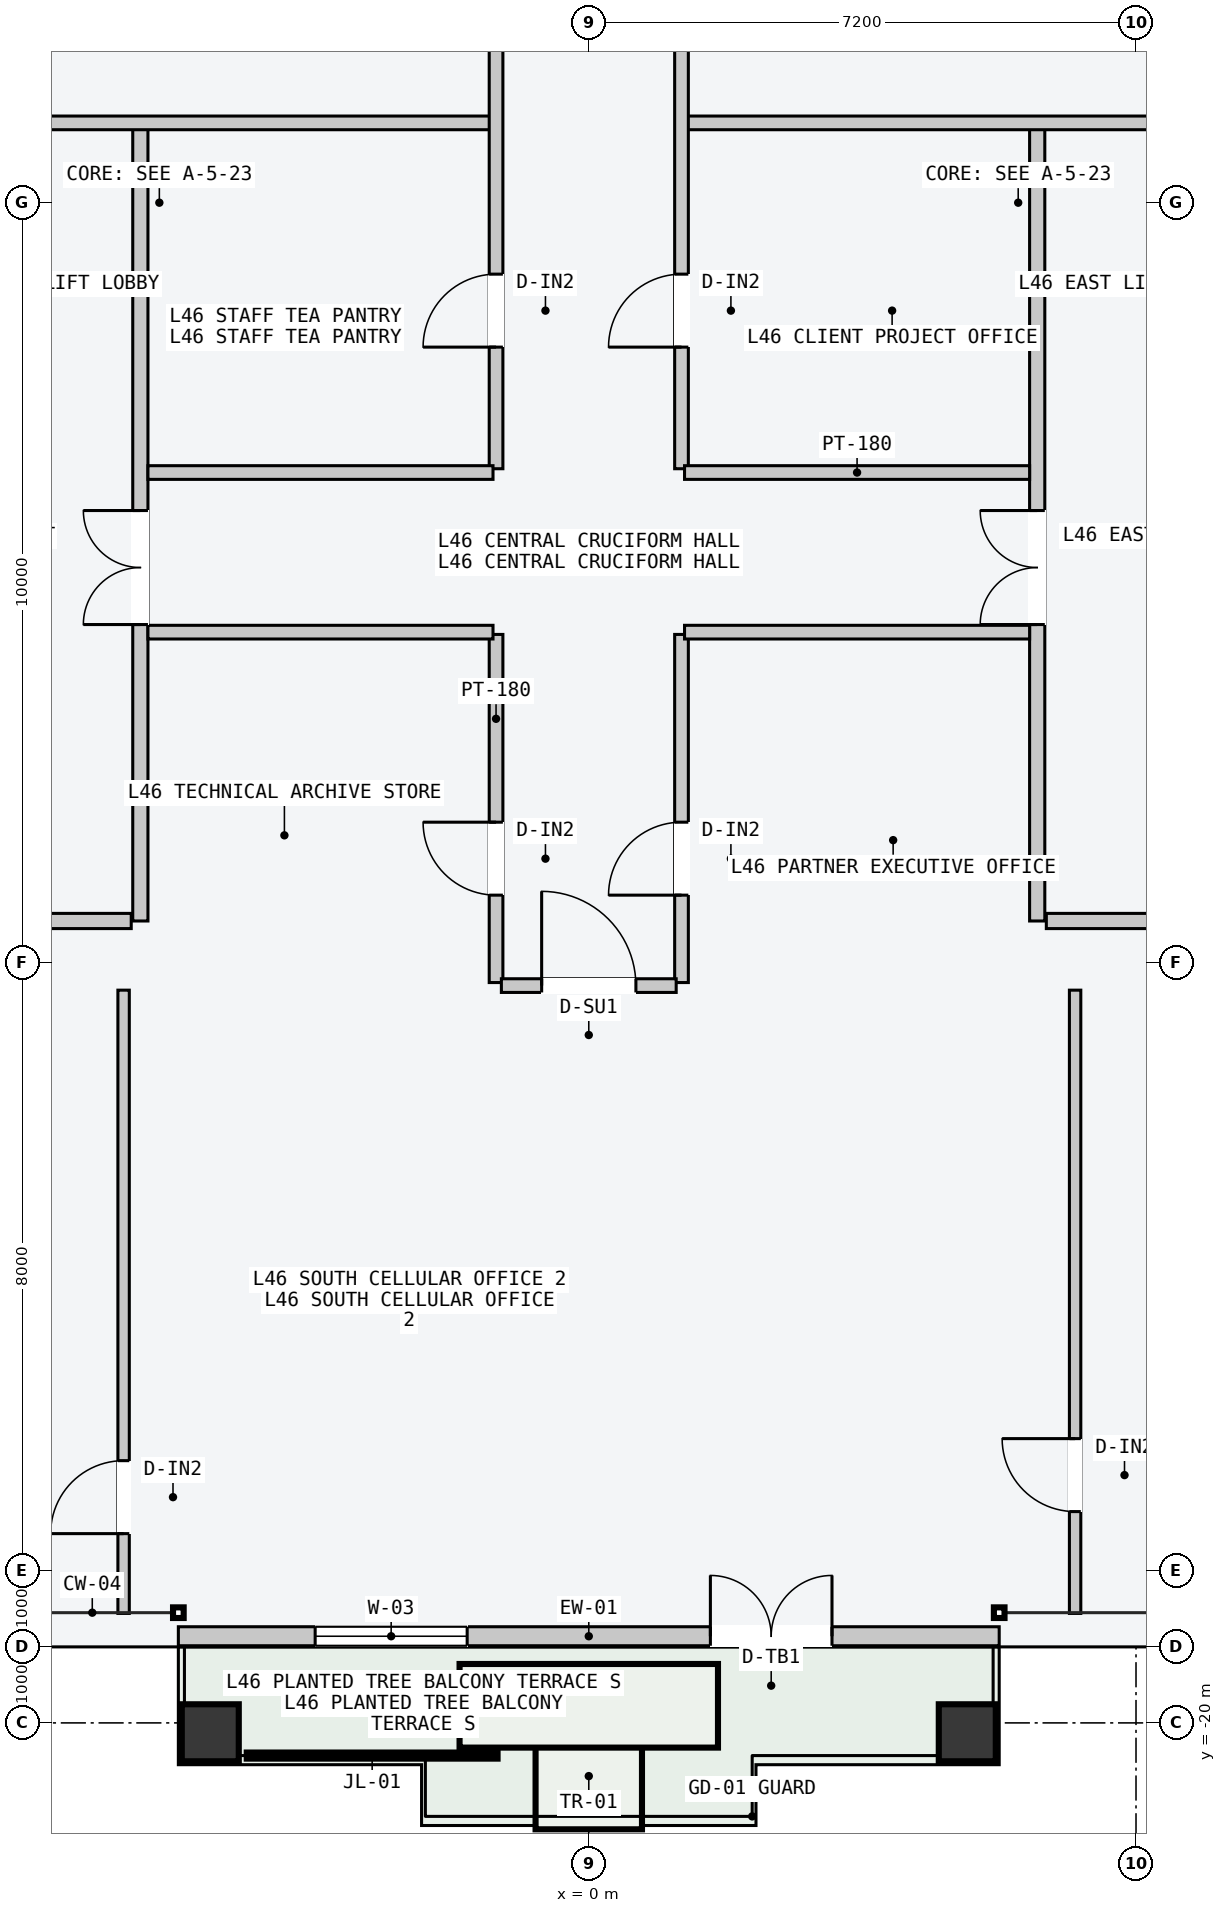
"""IFC4 building model, lengths in metres.
Left out: names, types, materials, properties, quantities, classifications, styles, units other than length and angle.
Written with IfcOpenShell. Run it as: python <this file> out.ifc"""

import sys

from ifc_helpers import new_model, si_unit, direction, frame, frame_2d, origin, origin_2d, place, context, subcontext, project, spatial, rectangle, hollow_rectangle, extrude, element, fill, save


model = new_model("IFC4")
c1 = context("Model", 3, precision=1e-05, world=origin(), true_north=direction((0.0, 1.0)))
c2 = subcontext(c1, "Body", "Model", "MODEL_VIEW")
j1 = project(units=[si_unit("LENGTHUNIT", "METRE"), si_unit("PLANEANGLEUNIT", "RADIAN")], contexts=[c1])
p1 = place(None, origin())
s1 = spatial("IfcSite", under=j1, at=p1, CompositionType="ELEMENT")
p2 = place(p1, origin())
s2 = spatial("IfcBuilding", under=s1, at=p2, CompositionType="ELEMENT")
p3 = place(p2, frame((0.0, 0.0, 176.7)))
s3 = spatial("IfcBuildingStorey", under=s2, at=p3, CompositionType="ELEMENT", Elevation=176.7)
for number, where, z_axis, x_axis in (
    (1, (-4.98, -20.13, 0.0), (0.0, 0.0, 1.0), (1.0, 0.0, 0.0)),
    (2, (4.98, -20.13, 0.0), (0.0, 0.0, 1.0), (1.0, 0.0, 0.0)),
):
    element("IfcColumn", number, at=place(p3, frame(where, z_axis=z_axis, x_axis=x_axis)), inside=s3, PredefinedType="COLUMN", context=c2, shape_type="SweptSolid", body=[
        extrude(hollow_rectangle(XDim=0.75, YDim=0.75, WallThickness=0.032, at=origin_2d()), origin(), (0.0, 0.0, 1.0), 3.6),
    ])
p4 = place(p3, frame((-5.4, -18.86, 0.0), z_axis=(0.0, 0.0, 1.0), x_axis=(1.0, 0.0, 0.0)))
e3 = element("IfcWall", 3, at=p4, inside=s3, PredefinedType="STANDARD", context=c2, shape_type="SweptSolid", body=[
    extrude(rectangle(XDim=10.8, YDim=0.25, at=frame_2d((5.4, 0.0))), origin(), (0.0, 0.0, 1.0), 3.4),
])
p5 = place(p4, frame((7.0, 0.0, 0.0)))
e4 = element("IfcOpeningElement", 4, at=p5, cuts=e3, PredefinedType="OPENING", context=c2, shape_type="SweptSolid", body=[
    extrude(rectangle(XDim=1.6, YDim=2.2, at=frame_2d((0.8, 1.1))), frame((0.0, 0.135, 0.0), z_axis=(0.0, -1.0, 0.0), x_axis=(1.0, 0.0, 0.0)), (0.0, 0.0, 1.0), 0.27),
])
p6 = place(p4, frame((1.8, 0.0, 0.85)))
e5 = element("IfcOpeningElement", 5, at=p6, cuts=e3, PredefinedType="OPENING", context=c2, shape_type="SweptSolid", body=[
    extrude(rectangle(XDim=2.0, YDim=2.1, at=frame_2d((1.0, 1.05))), frame((0.0, 0.135, 0.0), z_axis=(0.0, -1.0, 0.0), x_axis=(1.0, 0.0, 0.0)), (0.0, 0.0, 1.0), 0.27),
])
p7 = place(p3, frame((-5.9, -9.45, 0.0), z_axis=(0.0, 0.0, 1.0), x_axis=(0.0, 1.0, 0.0)))
e6 = element("IfcWall", 6, at=p7, inside=s3, PredefinedType="PARTITIONING", context=c2, shape_type="SweptSolid", body=[
    extrude(rectangle(XDim=10.5, YDim=0.2, at=frame_2d((5.25, 0.0))), origin(), (0.0, 0.0, 1.0), 3.4),
])
p8 = place(p7, frame((3.9, 0.0, 0.0)))
e7 = element("IfcOpeningElement", 7, at=p8, cuts=e6, PredefinedType="OPENING", context=c2, shape_type="SweptSolid", body=[
    extrude(rectangle(XDim=1.5, YDim=2.2, at=frame_2d((0.75, 1.1))), frame((0.0, 0.11, 0.0), z_axis=(0.0, -1.0, 0.0), x_axis=(1.0, 0.0, 0.0)), (0.0, 0.0, 1.0), 0.22),
])
p9 = place(p3, frame((-6.02, -9.45, 0.0), z_axis=(0.0, 0.0, 1.0), x_axis=(-1.0, 0.0, 0.0)))
e8 = element("IfcWall", 8, at=p9, inside=s3, PredefinedType="PARTITIONING", context=c2, shape_type="SweptSolid", body=[
    extrude(rectangle(XDim=1.8, YDim=0.2, at=frame_2d((0.9, 0.0))), origin(), (0.0, 0.0, 1.0), 3.4),
])
p10 = place(p3, frame((5.9, -9.45, 0.0), z_axis=(0.0, 0.0, 1.0), x_axis=(0.0, 1.0, 0.0)))
e9 = element("IfcWall", 9, at=p10, inside=s3, PredefinedType="PARTITIONING", context=c2, shape_type="SweptSolid", body=[
    extrude(rectangle(XDim=10.5, YDim=0.2, at=frame_2d((5.25, 0.0))), origin(), (0.0, 0.0, 1.0), 3.4),
])
p11 = place(p10, frame((3.9, 0.0, 0.0)))
e10 = element("IfcOpeningElement", 10, at=p11, cuts=e9, PredefinedType="OPENING", context=c2, shape_type="SweptSolid", body=[
    extrude(rectangle(XDim=1.5, YDim=2.2, at=frame_2d((0.75, 1.1))), frame((0.0, 0.11, 0.0), z_axis=(0.0, -1.0, 0.0), x_axis=(1.0, 0.0, 0.0)), (0.0, 0.0, 1.0), 0.22),
])
p12 = place(p3, frame((6.02, -9.45, 0.0), z_axis=(0.0, 0.0, 1.0), x_axis=(1.0, 0.0, 0.0)))
e11 = element("IfcWall", 11, at=p12, inside=s3, PredefinedType="PARTITIONING", context=c2, shape_type="SweptSolid", body=[
    extrude(rectangle(XDim=1.8, YDim=0.2, at=frame_2d((0.9, 0.0))), origin(), (0.0, 0.0, 1.0), 3.4),
])
p13 = place(p3, frame((-10.05, 1.05, 0.0), z_axis=(0.0, 0.0, 1.0), x_axis=(1.0, 0.0, 0.0)))
e12 = element("IfcWall", 12, at=p13, inside=s3, PredefinedType="PARTITIONING", context=c2, shape_type="SweptSolid", body=[
    extrude(rectangle(XDim=8.79, YDim=0.18, at=frame_2d((4.395, 0.0))), origin(), (0.0, 0.0, 1.0), 3.4),
])
p14 = place(p3, frame((-1.22, -3.5, 0.0), z_axis=(0.0, 0.0, 1.0), x_axis=(0.0, 1.0, 0.0)))
e13 = element("IfcWall", 13, at=p14, inside=s3, PredefinedType="PARTITIONING", context=c2, shape_type="SweptSolid", body=[
    extrude(rectangle(XDim=15.17, YDim=0.18, at=frame_2d((7.585, 0.0))), origin(), (0.0, 0.0, 1.0), 3.4),
])
p15 = place(p14, frame((6.1, 0.0, 0.0)))
e14 = element("IfcOpeningElement", 14, at=p15, cuts=e13, PredefinedType="OPENING", context=c2, shape_type="SweptSolid", body=[
    extrude(rectangle(XDim=1.24, YDim=2.24, at=frame_2d((0.62, 1.12))), frame((0.0, 0.1, 0.0), z_axis=(0.0, -1.0, 0.0), x_axis=(1.0, 0.0, 0.0)), (0.0, 0.0, 1.0), 0.2),
])
p16 = place(p14, frame((1.6, 0.0, 0.0)))
e15 = element("IfcOpeningElement", 15, at=p16, cuts=e13, PredefinedType="OPENING", context=c2, shape_type="SweptSolid", body=[
    extrude(rectangle(XDim=0.96, YDim=2.18, at=frame_2d((0.48, 1.09))), frame((0.0, 0.1, 0.0), z_axis=(0.0, -1.0, 0.0), x_axis=(1.0, 0.0, 0.0)), (0.0, 0.0, 1.0), 0.2),
])
p17 = place(p3, frame((-5.8, -3.55, 0.0), z_axis=(0.0, 0.0, 1.0), x_axis=(1.0, 0.0, 0.0)))
e16 = element("IfcWall", 16, at=p17, inside=s3, PredefinedType="PARTITIONING", context=c2, shape_type="SweptSolid", body=[
    extrude(rectangle(XDim=4.54, YDim=0.18, at=frame_2d((2.27, 0.0))), origin(), (0.0, 0.0, 1.0), 3.4),
])
p18 = place(p3, frame((1.26, 1.05, 0.0), z_axis=(0.0, 0.0, 1.0), x_axis=(1.0, 0.0, 0.0)))
e17 = element("IfcWall", 17, at=p18, inside=s3, PredefinedType="PARTITIONING", context=c2, shape_type="SweptSolid", body=[
    extrude(rectangle(XDim=8.8, YDim=0.18, at=frame_2d((4.4, 0.0))), origin(), (0.0, 0.0, 1.0), 3.4),
])
p19 = place(p3, frame((1.22, -3.5, 0.0), z_axis=(0.0, 0.0, 1.0), x_axis=(0.0, 1.0, 0.0)))
e18 = element("IfcWall", 18, at=p19, inside=s3, PredefinedType="PARTITIONING", context=c2, shape_type="SweptSolid", body=[
    extrude(rectangle(XDim=15.17, YDim=0.18, at=frame_2d((7.585, 0.0))), origin(), (0.0, 0.0, 1.0), 3.4),
])
p20 = place(p19, frame((6.1, 0.0, 0.0)))
e19 = element("IfcOpeningElement", 19, at=p20, cuts=e18, PredefinedType="OPENING", context=c2, shape_type="SweptSolid", body=[
    extrude(rectangle(XDim=1.24, YDim=2.24, at=frame_2d((0.62, 1.12))), frame((0.0, 0.1, 0.0), z_axis=(0.0, -1.0, 0.0), x_axis=(1.0, 0.0, 0.0)), (0.0, 0.0, 1.0), 0.2),
])
p21 = place(p19, frame((1.6, 0.0, 0.0)))
e20 = element("IfcOpeningElement", 20, at=p21, cuts=e18, PredefinedType="OPENING", context=c2, shape_type="SweptSolid", body=[
    extrude(rectangle(XDim=0.96, YDim=2.18, at=frame_2d((0.48, 1.09))), frame((0.0, 0.1, 0.0), z_axis=(0.0, -1.0, 0.0), x_axis=(1.0, 0.0, 0.0)), (0.0, 0.0, 1.0), 0.2),
])
p22 = place(p3, frame((1.26, -3.55, 0.0), z_axis=(0.0, 0.0, 1.0), x_axis=(1.0, 0.0, 0.0)))
e21 = element("IfcWall", 21, at=p22, inside=s3, PredefinedType="PARTITIONING", context=c2, shape_type="SweptSolid", body=[
    extrude(rectangle(XDim=4.54, YDim=0.18, at=frame_2d((2.27, 0.0))), origin(), (0.0, 0.0, 1.0), 3.4),
])
p23 = place(p3, frame((-1.22, -10.26, 0.0), z_axis=(0.0, 0.0, 1.0), x_axis=(0.0, 1.0, 0.0)))
e22 = element("IfcWall", 22, at=p23, inside=s3, PredefinedType="PARTITIONING", context=c2, shape_type="SweptSolid", body=[
    extrude(rectangle(XDim=4.58, YDim=0.18, at=frame_2d((2.29, 0.0))), origin(), (0.0, 0.0, 1.0), 3.4),
])
p24 = place(p23, frame((1.15, 0.0, 0.0)))
e23 = element("IfcOpeningElement", 23, at=p24, cuts=e22, PredefinedType="OPENING", context=c2, shape_type="SweptSolid", body=[
    extrude(rectangle(XDim=0.96, YDim=2.18, at=frame_2d((0.48, 1.09))), frame((0.0, 0.1, 0.0), z_axis=(0.0, -1.0, 0.0), x_axis=(1.0, 0.0, 0.0)), (0.0, 0.0, 1.0), 0.2),
])
p25 = place(p3, frame((1.22, -10.26, 0.0), z_axis=(0.0, 0.0, 1.0), x_axis=(0.0, 1.0, 0.0)))
e24 = element("IfcWall", 24, at=p25, inside=s3, PredefinedType="PARTITIONING", context=c2, shape_type="SweptSolid", body=[
    extrude(rectangle(XDim=4.58, YDim=0.18, at=frame_2d((2.29, 0.0))), origin(), (0.0, 0.0, 1.0), 3.4),
])
p26 = place(p25, frame((1.15, 0.0, 0.0)))
e25 = element("IfcOpeningElement", 25, at=p26, cuts=e24, PredefinedType="OPENING", context=c2, shape_type="SweptSolid", body=[
    extrude(rectangle(XDim=0.96, YDim=2.18, at=frame_2d((0.48, 1.09))), frame((0.0, 0.1, 0.0), z_axis=(0.0, -1.0, 0.0), x_axis=(1.0, 0.0, 0.0)), (0.0, 0.0, 1.0), 0.2),
])
for number, where, z_axis, x_axis in (
    (26, (-5.8, -5.65, 0.0), (0.0, 0.0, 1.0), (1.0, 0.0, 0.0)),
    (27, (1.26, -5.65, 0.0), (0.0, 0.0, 1.0), (1.0, 0.0, 0.0)),
):
    element("IfcWall", number, at=place(p3, frame(where, z_axis=z_axis, x_axis=x_axis)), inside=s3, PredefinedType="PARTITIONING", context=c2, shape_type="SweptSolid", body=[
        extrude(rectangle(XDim=4.54, YDim=0.18, at=frame_2d((2.27, 0.0))), origin(), (0.0, 0.0, 1.0), 3.4),
    ])
p27 = place(p3, frame((-6.12, -18.56, 0.0), z_axis=(0.0, 0.0, 1.0), x_axis=(0.0, 1.0, 0.0)))
e28 = element("IfcWall", 28, at=p27, inside=s3, PredefinedType="PARTITIONING", context=c2, shape_type="SweptSolid", body=[
    extrude(rectangle(XDim=8.2, YDim=0.15, at=frame_2d((4.1, 0.0))), origin(), (0.0, 0.0, 1.0), 3.4),
])
p28 = place(p27, frame((1.05, 0.0, 0.0)))
e29 = element("IfcOpeningElement", 29, at=p28, cuts=e28, PredefinedType="OPENING", context=c2, shape_type="SweptSolid", body=[
    extrude(rectangle(XDim=0.96, YDim=2.18, at=frame_2d((0.48, 1.09))), frame((0.0, 0.085, 0.0), z_axis=(0.0, -1.0, 0.0), x_axis=(1.0, 0.0, 0.0)), (0.0, 0.0, 1.0), 0.17),
])
p29 = place(p3, frame((6.399, -18.56, 0.0), z_axis=(0.0, 0.0, 1.0), x_axis=(0.0, 1.0, 0.0)))
e30 = element("IfcWall", 30, at=p29, inside=s3, PredefinedType="PARTITIONING", context=c2, shape_type="SweptSolid", body=[
    extrude(rectangle(XDim=8.2, YDim=0.15, at=frame_2d((4.1, 0.0))), origin(), (0.0, 0.0, 1.0), 3.4),
])
p30 = place(p29, frame((1.34, 0.0, 0.0)))
e31 = element("IfcOpeningElement", 31, at=p30, cuts=e30, PredefinedType="OPENING", context=c2, shape_type="SweptSolid", body=[
    extrude(rectangle(XDim=0.96, YDim=2.18, at=frame_2d((0.48, 1.09))), frame((0.0, 0.085, 0.0), z_axis=(0.0, -1.0, 0.0), x_axis=(1.0, 0.0, 0.0)), (0.0, 0.0, 1.0), 0.17),
])
p31 = place(p3, frame((-1.15, -10.3, 0.0), z_axis=(0.0, 0.0, 1.0), x_axis=(1.0, 0.0, 0.0)))
e32 = element("IfcWall", 32, at=p31, inside=s3, PredefinedType="PARTITIONING", context=c2, shape_type="SweptSolid", body=[
    extrude(rectangle(XDim=2.3, YDim=0.18, at=frame_2d((1.15, 0.0))), origin(), (0.0, 0.0, 1.0), 3.4),
])
p32 = place(p31, frame((0.53, 0.0, 0.0)))
e33 = element("IfcOpeningElement", 33, at=p32, cuts=e32, PredefinedType="OPENING", context=c2, shape_type="SweptSolid", body=[
    extrude(rectangle(XDim=1.24, YDim=2.24, at=frame_2d((0.62, 1.12))), frame((0.0, 0.1, 0.0), z_axis=(0.0, -1.0, 0.0), x_axis=(1.0, 0.0, 0.0)), (0.0, 0.0, 1.0), 0.2),
])
p33 = place(p5, origin())
e34 = element("IfcDoor", 34, at=p33, inside=s3, OperationType="DOUBLE_DOOR_SINGLE_SWING", PredefinedType="DOOR", context=c2, shape_type="SweptSolid", body=[
    extrude(rectangle(XDim=1.6, YDim=2.2, at=frame_2d((0.8, 1.1))), frame((0.0, 0.025, 0.0), z_axis=(0.0, -1.0, 0.0), x_axis=(1.0, 0.0, 0.0)), (0.0, 0.0, 1.0), 0.05),
])
fill(e4, e34)
p34 = place(p6, origin())
e35 = element("IfcWindow", 35, at=p34, inside=s3, PartitioningType="SINGLE_PANEL", PredefinedType="WINDOW", context=c2, shape_type="SweptSolid", body=[
    extrude(rectangle(XDim=2.0, YDim=2.1, at=frame_2d((1.0, 1.05))), frame((0.0, 0.03, 0.0), z_axis=(0.0, -1.0, 0.0), x_axis=(1.0, 0.0, 0.0)), (0.0, 0.0, 1.0), 0.06),
])
fill(e5, e35)
p35 = place(p8, origin())
e36 = element("IfcDoor", 36, at=p35, inside=s3, OperationType="DOUBLE_DOOR_SINGLE_SWING", PredefinedType="DOOR", context=c2, shape_type="SweptSolid", body=[
    extrude(rectangle(XDim=1.5, YDim=2.2, at=frame_2d((0.75, 1.1))), frame((0.0, 0.025, 0.0), z_axis=(0.0, -1.0, 0.0), x_axis=(1.0, 0.0, 0.0)), (0.0, 0.0, 1.0), 0.05),
])
fill(e7, e36)
p36 = place(p11, origin())
e37 = element("IfcDoor", 37, at=p36, inside=s3, OperationType="DOUBLE_DOOR_SINGLE_SWING", PredefinedType="DOOR", context=c2, shape_type="SweptSolid", body=[
    extrude(rectangle(XDim=1.5, YDim=2.2, at=frame_2d((0.75, 1.1))), frame((0.0, 0.025, 0.0), z_axis=(0.0, -1.0, 0.0), x_axis=(1.0, 0.0, 0.0)), (0.0, 0.0, 1.0), 0.05),
])
fill(e10, e37)
p37 = place(p16, origin())
e38 = element("IfcDoor", 38, at=p37, inside=s3, OperationType="SINGLE_SWING_LEFT", PredefinedType="DOOR", context=c2, shape_type="SweptSolid", body=[
    extrude(rectangle(XDim=0.96, YDim=2.18, at=frame_2d((0.48, 1.09))), frame((0.0, 0.025, 0.0), z_axis=(0.0, -1.0, 0.0), x_axis=(1.0, 0.0, 0.0)), (0.0, 0.0, 1.0), 0.05),
])
fill(e15, e38)
p38 = place(p21, origin())
e39 = element("IfcDoor", 39, at=p38, inside=s3, OperationType="SINGLE_SWING_LEFT", PredefinedType="DOOR", context=c2, shape_type="SweptSolid", body=[
    extrude(rectangle(XDim=0.96, YDim=2.18, at=frame_2d((0.48, 1.09))), frame((0.0, 0.025, 0.0), z_axis=(0.0, -1.0, 0.0), x_axis=(1.0, 0.0, 0.0)), (0.0, 0.0, 1.0), 0.05),
])
fill(e20, e39)
p39 = place(p24, origin())
e40 = element("IfcDoor", 40, at=p39, inside=s3, OperationType="SINGLE_SWING_RIGHT", PredefinedType="DOOR", context=c2, shape_type="SweptSolid", body=[
    extrude(rectangle(XDim=0.96, YDim=2.18, at=frame_2d((0.48, 1.09))), frame((0.0, 0.025, 0.0), z_axis=(0.0, -1.0, 0.0), x_axis=(1.0, 0.0, 0.0)), (0.0, 0.0, 1.0), 0.05),
])
fill(e23, e40)
p40 = place(p26, origin())
e41 = element("IfcDoor", 41, at=p40, inside=s3, OperationType="SINGLE_SWING_LEFT", PredefinedType="DOOR", context=c2, shape_type="SweptSolid", body=[
    extrude(rectangle(XDim=0.96, YDim=2.18, at=frame_2d((0.48, 1.09))), frame((0.0, 0.025, 0.0), z_axis=(0.0, -1.0, 0.0), x_axis=(1.0, 0.0, 0.0)), (0.0, 0.0, 1.0), 0.05),
])
fill(e25, e41)
p41 = place(p28, origin())
e42 = element("IfcDoor", 42, at=p41, inside=s3, OperationType="SINGLE_SWING_LEFT", PredefinedType="DOOR", context=c2, shape_type="SweptSolid", body=[
    extrude(rectangle(XDim=0.96, YDim=2.18, at=frame_2d((0.48, 1.09))), frame((0.0, 0.025, 0.0), z_axis=(0.0, -1.0, 0.0), x_axis=(1.0, 0.0, 0.0)), (0.0, 0.0, 1.0), 0.05),
])
fill(e29, e42)
p42 = place(p30, origin())
e43 = element("IfcDoor", 43, at=p42, inside=s3, OperationType="SINGLE_SWING_RIGHT", PredefinedType="DOOR", context=c2, shape_type="SweptSolid", body=[
    extrude(rectangle(XDim=0.96, YDim=2.18, at=frame_2d((0.48, 1.09))), frame((0.0, 0.025, 0.0), z_axis=(0.0, -1.0, 0.0), x_axis=(1.0, 0.0, 0.0)), (0.0, 0.0, 1.0), 0.05),
])
fill(e31, e43)
p43 = place(p32, origin())
e44 = element("IfcDoor", 44, at=p43, inside=s3, OperationType="SINGLE_SWING_LEFT", PredefinedType="DOOR", context=c2, shape_type="SweptSolid", body=[
    extrude(rectangle(XDim=1.24, YDim=2.24, at=frame_2d((0.62, 1.12))), frame((0.0, 0.025, 0.0), z_axis=(0.0, -1.0, 0.0), x_axis=(1.0, 0.0, 0.0)), (0.0, 0.0, 1.0), 0.05),
])
fill(e33, e44)
save(model, sys.argv[1])
